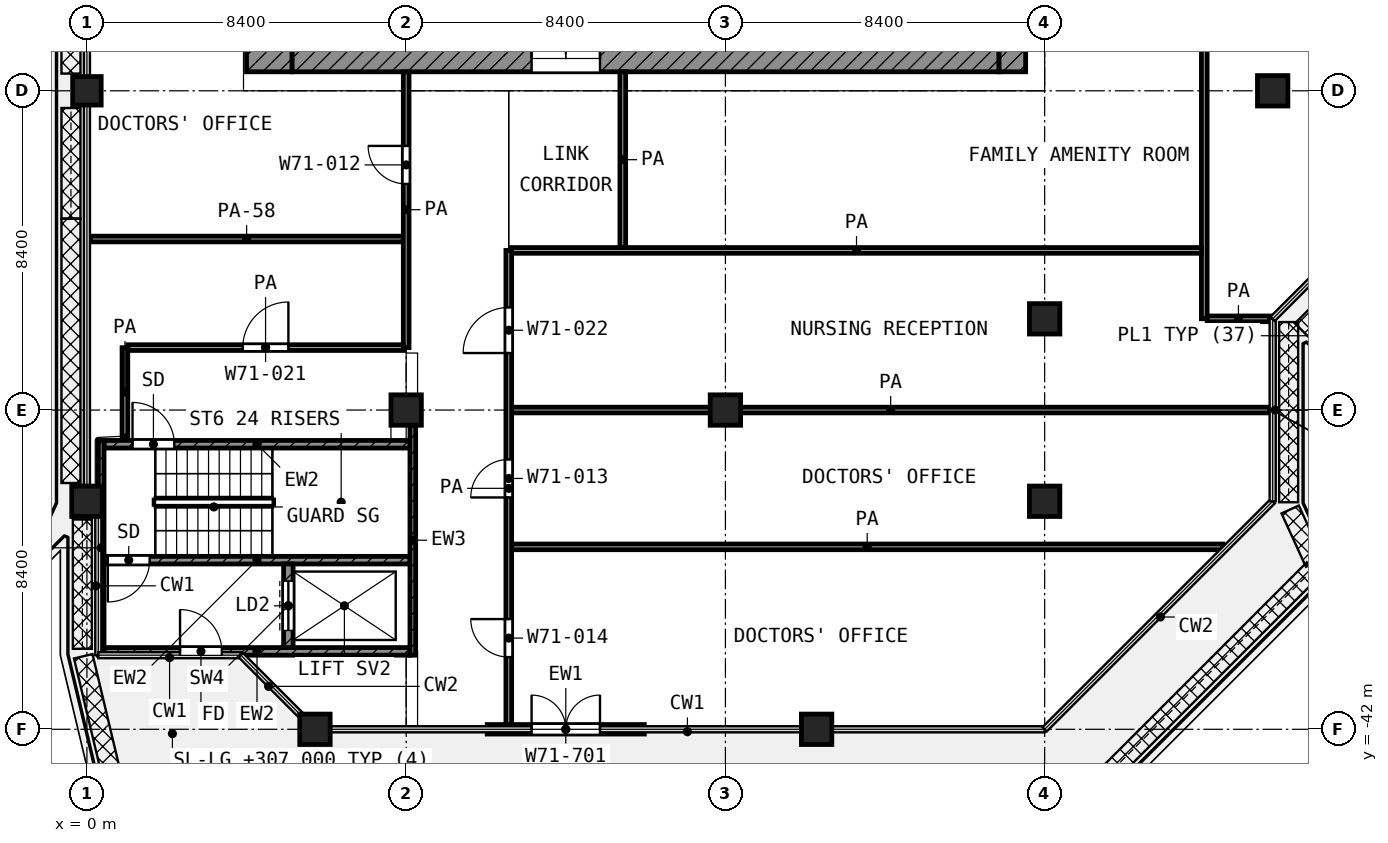
"""IFC4 building model, lengths in metres.
Left out: names, types, materials, properties, quantities, classifications, styles, units other than length and angle.
Written with IfcOpenShell. Run it as: python <this file> out.ifc"""

import sys

from ifc_helpers import new_model, si_unit, direction, frame, frame_2d, origin, origin_2d, place, context, subcontext, project, spatial, rectangle, extrude, element, fill, save


model = new_model("IFC4")
c1 = context("Model", 3, precision=1e-05, world=origin(), true_north=direction((0.0, 1.0)))
c2 = subcontext(c1, "Body", "Model", "MODEL_VIEW")
j1 = project(units=[si_unit("LENGTHUNIT", "METRE"), si_unit("PLANEANGLEUNIT", "RADIAN")], contexts=[c1])
p1 = place(None, origin())
s1 = spatial("IfcSite", under=j1, at=p1, CompositionType="ELEMENT")
p2 = place(p1, origin())
s2 = spatial("IfcBuilding", under=s1, at=p2, CompositionType="ELEMENT")
p3 = place(p2, frame((0.0, 0.0, 307.0)))
s3 = spatial("IfcBuildingStorey", under=s2, at=p3, CompositionType="ELEMENT", Elevation=307.0)
p4 = place(p3, frame((0.0, -25.2, 0.0), z_axis=(0.0, 0.0, 1.0), x_axis=(1.0, 0.0, 0.0)))
e1 = element("IfcColumn", 1, at=p4, inside=s3, PredefinedType="COLUMN", context=c2, shape_type="SweptSolid", body=[
    extrude(rectangle(XDim=0.75, YDim=0.75, at=origin_2d()), origin(), (0.0, 0.0, 1.0), 4.2),
])
for number, where, z_axis, x_axis in (
    (2, (31.2, -25.2, 0.0), (0.0, 0.0, 1.0), (1.0, 0.0, 0.0)),
    (3, (25.2, -31.2, 0.0), (0.0, 0.0, 1.0), (1.0, 0.0, 0.0)),
    (4, (8.4, -33.6, 0.0), (0.0, 0.0, 1.0), (1.0, 0.0, 0.0)),
    (5, (16.8, -33.6, 0.0), (0.0, 0.0, 1.0), (1.0, 0.0, 0.0)),
    (6, (0.0, -36.0, 0.0), (0.0, 0.0, 1.0), (1.0, 0.0, 0.0)),
    (7, (25.2, -36.0, 0.0), (0.0, 0.0, 1.0), (1.0, 0.0, 0.0)),
    (8, (6.0, -42.0, 0.0), (0.0, 0.0, 1.0), (1.0, 0.0, 0.0)),
    (9, (19.2, -42.0, 0.0), (0.0, 0.0, 1.0), (1.0, 0.0, 0.0)),
):
    element("IfcColumn", number, at=place(p3, frame(where, z_axis=z_axis, x_axis=x_axis)), inside=s3, PredefinedType="COLUMN", context=c2, shape_type="SweptSolid", body=[
        extrude(rectangle(XDim=0.8, YDim=0.8, at=origin_2d()), origin(), (0.0, 0.0, 1.0), 4.2),
    ])
p5 = place(p3, frame((10.533, -42.0, 0.0), z_axis=(0.0, 0.0, 1.0), x_axis=(1.0, 0.0, 0.0)))
e10 = element("IfcWall", 10, at=p5, inside=s3, PredefinedType="SOLIDWALL", context=c2, shape_type="SweptSolid", body=[
    extrude(rectangle(XDim=4.133, YDim=0.25, at=frame_2d((2.067, 0.0))), origin(), (0.0, 0.0, 1.0), 3.48),
])
p6 = place(p5, frame((1.167, 0.0, 0.0)))
e11 = element("IfcOpeningElement", 11, at=p6, cuts=e10, PredefinedType="OPENING", context=c2, shape_type="SweptSolid", body=[
    extrude(rectangle(XDim=1.8, YDim=2.1, at=frame_2d((0.9, 1.05))), frame((0.0, 0.135, 0.0), z_axis=(0.0, -1.0, 0.0), x_axis=(1.0, 0.0, 0.0)), (0.0, 0.0, 1.0), 0.27),
])
p7 = place(p3, frame((4.8, -24.7, 0.0), z_axis=(0.0, 0.0, 1.0), x_axis=(0.0, 1.0, 0.0)))
e12 = element("IfcWall", 12, at=p7, inside=s3, PredefinedType="SHEAR", context=c2, shape_type="SweptSolid", body=[
    extrude(rectangle(XDim=19.3, YDim=1.2, at=frame_2d((9.65, 0.0))), origin(), (0.0, 0.0, 1.0), 3.6),
])
p8 = place(p7, frame((11.15, 0.0, 0.0)))
e13 = element("IfcOpeningElement", 13, at=p8, cuts=e12, PredefinedType="OPENING", context=c2, shape_type="SweptSolid", body=[
    extrude(rectangle(XDim=1.1, YDim=2.1, at=frame_2d((0.55, 1.05))), frame((0.0, 0.61, 0.0), z_axis=(0.0, -1.0, 0.0), x_axis=(1.0, 0.0, 0.0)), (0.0, 0.0, 1.0), 1.22),
])
p9 = place(p7, frame((1.85, 0.0, 0.0)))
e14 = element("IfcOpeningElement", 14, at=p9, cuts=e12, PredefinedType="OPENING", context=c2, shape_type="SweptSolid", body=[
    extrude(rectangle(XDim=1.1, YDim=2.1, at=frame_2d((0.55, 1.05))), frame((0.0, 0.61, 0.0), z_axis=(0.0, -1.0, 0.0), x_axis=(1.0, 0.0, 0.0)), (0.0, 0.0, 1.0), 1.22),
])
p10 = place(p3, frame((5.4, -24.35, 0.0), z_axis=(0.0, 0.0, 1.0), x_axis=(1.0, 0.0, 0.0)))
e15 = element("IfcWall", 15, at=p10, inside=s3, PredefinedType="SHEAR", context=c2, shape_type="SweptSolid", body=[
    extrude(rectangle(XDim=18.6, YDim=0.7, at=frame_2d((9.3, 0.0))), origin(), (0.0, 0.0, 1.0), 3.6),
])
p11 = place(p10, frame((6.3, 0.0, 0.0)))
e16 = element("IfcOpeningElement", 16, at=p11, cuts=e15, PredefinedType="OPENING", context=c2, shape_type="SweptSolid", body=[
    extrude(rectangle(XDim=1.8, YDim=2.1, at=frame_2d((0.9, 1.05))), frame((0.0, 0.36, 0.0), z_axis=(0.0, -1.0, 0.0), x_axis=(1.0, 0.0, 0.0)), (0.0, 0.0, 1.0), 0.72),
])
p12 = place(p3, frame((24.35, -24.7, 0.0), z_axis=(0.0, 0.0, 1.0), x_axis=(0.0, 1.0, 0.0)))
e17 = element("IfcWall", 17, at=p12, inside=s3, PredefinedType="SHEAR", context=c2, shape_type="SweptSolid", body=[
    extrude(rectangle(XDim=0.7, YDim=0.7, at=frame_2d((0.35, 0.0))), origin(), (0.0, 0.0, 1.0), 3.6),
])
p13 = place(p3, frame((0.375, -40.05, 0.0), z_axis=(0.0, 0.0, 1.0), x_axis=(0.0, 1.0, 0.0)))
e18 = element("IfcWall", 18, at=p13, inside=s3, PredefinedType="SHEAR", context=c2, shape_type="SweptSolid", body=[
    extrude(rectangle(XDim=5.65, YDim=0.15, at=frame_2d((2.825, 0.0))), origin(), (0.0, 0.0, 1.0), 3.6),
])
p14 = place(p3, frame((8.575, -40.05, 0.0), z_axis=(0.0, 0.0, 1.0), x_axis=(0.0, 1.0, 0.0)))
e19 = element("IfcWall", 19, at=p14, inside=s3, PredefinedType="SHEAR", context=c2, shape_type="SweptSolid", body=[
    extrude(rectangle(XDim=6.05, YDim=0.15, at=frame_2d((3.025, 0.0))), origin(), (0.0, 0.0, 1.0), 3.6),
])
p15 = place(p3, frame((0.45, -34.5, 0.0), z_axis=(0.0, 0.0, 1.0), x_axis=(1.0, 0.0, 0.0)))
e20 = element("IfcWall", 20, at=p15, inside=s3, PredefinedType="SHEAR", context=c2, shape_type="SweptSolid", body=[
    extrude(rectangle(XDim=8.05, YDim=0.2, at=frame_2d((4.025, 0.0))), origin(), (0.0, 0.0, 1.0), 3.6),
])
p16 = place(p15, frame((0.75, 0.0, 0.0)))
e21 = element("IfcOpeningElement", 21, at=p16, cuts=e20, PredefinedType="OPENING", context=c2, shape_type="SweptSolid", body=[
    extrude(rectangle(XDim=1.1, YDim=2.1, at=frame_2d((0.55, 1.05))), frame((0.0, 0.11, 0.0), z_axis=(0.0, -1.0, 0.0), x_axis=(1.0, 0.0, 0.0)), (0.0, 0.0, 1.0), 0.22),
])
p17 = place(p3, frame((0.45, -37.55, 0.0), z_axis=(0.0, 0.0, 1.0), x_axis=(1.0, 0.0, 0.0)))
e22 = element("IfcWall", 22, at=p17, inside=s3, PredefinedType="SHEAR", context=c2, shape_type="SweptSolid", body=[
    extrude(rectangle(XDim=8.05, YDim=0.2, at=frame_2d((4.025, 0.0))), origin(), (0.0, 0.0, 1.0), 3.6),
])
p18 = place(p17, frame((0.1, 0.0, 0.0)))
e23 = element("IfcOpeningElement", 23, at=p18, cuts=e22, PredefinedType="OPENING", context=c2, shape_type="SweptSolid", body=[
    extrude(rectangle(XDim=1.1, YDim=2.1, at=frame_2d((0.55, 1.05))), frame((0.0, 0.11, 0.0), z_axis=(0.0, -1.0, 0.0), x_axis=(1.0, 0.0, 0.0)), (0.0, 0.0, 1.0), 0.22),
])
p19 = place(p3, frame((0.45, -39.95, 0.0), z_axis=(0.0, 0.0, 1.0), x_axis=(1.0, 0.0, 0.0)))
e24 = element("IfcWall", 24, at=p19, inside=s3, PredefinedType="SHEAR", context=c2, shape_type="SweptSolid", body=[
    extrude(rectangle(XDim=8.05, YDim=0.2, at=frame_2d((4.025, 0.0))), origin(), (0.0, 0.0, 1.0), 3.6),
])
p20 = place(p19, frame((2.0, 0.0, 0.0)))
e25 = element("IfcOpeningElement", 25, at=p20, cuts=e24, PredefinedType="OPENING", context=c2, shape_type="SweptSolid", body=[
    extrude(rectangle(XDim=1.1, YDim=2.1, at=frame_2d((0.55, 1.05))), frame((0.0, 0.11, 0.0), z_axis=(0.0, -1.0, 0.0), x_axis=(1.0, 0.0, 0.0)), (0.0, 0.0, 1.0), 0.22),
])
p21 = place(p3, frame((5.3, -39.85, 0.0), z_axis=(0.0, 0.0, 1.0), x_axis=(0.0, 1.0, 0.0)))
e26 = element("IfcWall", 26, at=p21, inside=s3, PredefinedType="SHEAR", context=c2, shape_type="SweptSolid", body=[
    extrude(rectangle(XDim=2.2, YDim=0.25, at=frame_2d((1.1, 0.0))), origin(), (0.0, 0.0, 1.0), 3.6),
])
p22 = place(p21, frame((0.45, 0.0, 0.0)))
e27 = element("IfcOpeningElement", 27, at=p22, cuts=e26, PredefinedType="OPENING", context=c2, shape_type="SweptSolid", body=[
    extrude(rectangle(XDim=1.3, YDim=2.1, at=frame_2d((0.65, 1.05))), frame((0.0, 0.135, 0.0), z_axis=(0.0, -1.0, 0.0), x_axis=(1.0, 0.0, 0.0)), (0.0, 0.0, 1.0), 0.27),
])
p23 = place(p3, frame((11.175, -37.2, 0.0), z_axis=(0.0, 0.0, 1.0), x_axis=(1.0, 0.0, 0.0)))
e28 = element("IfcWall", 28, at=p23, inside=s3, PredefinedType="PARTITIONING", context=c2, shape_type="SweptSolid", body=[
    extrude(rectangle(XDim=18.712, YDim=0.15, at=frame_2d((9.356, 0.0))), origin(), (0.0, 0.0, 1.0), 3.6),
])
p24 = place(p3, frame((11.175, -33.6, 0.0), z_axis=(0.0, 0.0, 1.0), x_axis=(1.0, 0.0, 0.0)))
e29 = element("IfcWall", 29, at=p24, inside=s3, PredefinedType="PARTITIONING", context=c2, shape_type="SweptSolid", body=[
    extrude(rectangle(XDim=19.945, YDim=0.15, at=frame_2d((9.973, 0.0))), origin(), (0.0, 0.0, 1.0), 3.6),
])
p25 = place(p3, frame((1.076, -31.957, 0.0), z_axis=(0.0, 0.0, 1.0), x_axis=(1.0, 0.0, 0.0)))
e30 = element("IfcWall", 30, at=p25, inside=s3, PredefinedType="PARTITIONING", context=c2, shape_type="SweptSolid", body=[
    extrude(rectangle(XDim=7.249, YDim=0.15, at=frame_2d((3.625, 0.0))), origin(), (0.0, 0.0, 1.0), 3.6),
])
p26 = place(p25, frame((3.025, 0.0, 0.0)))
e31 = element("IfcOpeningElement", 31, at=p26, cuts=e30, PredefinedType="OPENING", context=c2, shape_type="SweptSolid", body=[
    extrude(rectangle(XDim=1.2, YDim=2.1, at=frame_2d((0.6, 1.05))), frame((0.0, 0.085, 0.0), z_axis=(0.0, -1.0, 0.0), x_axis=(1.0, 0.0, 0.0)), (0.0, 0.0, 1.0), 0.17),
])
p27 = place(p3, frame((29.477, -31.2, 0.0), z_axis=(0.0, 0.0, 1.0), x_axis=(1.0, 0.0, 0.0)))
e32 = element("IfcWall", 32, at=p27, inside=s3, PredefinedType="PARTITIONING", context=c2, shape_type="SweptSolid", body=[
    extrude(rectangle(XDim=1.643, YDim=0.15, at=frame_2d((0.822, 0.0))), origin(), (0.0, 0.0, 1.0), 3.6),
])
p28 = place(p3, frame((11.175, -29.4, 0.0), z_axis=(0.0, 0.0, 1.0), x_axis=(1.0, 0.0, 0.0)))
e33 = element("IfcWall", 33, at=p28, inside=s3, PredefinedType="PARTITIONING", context=c2, shape_type="SweptSolid", body=[
    extrude(rectangle(XDim=18.15, YDim=0.15, at=frame_2d((9.075, 0.0))), origin(), (0.0, 0.0, 1.0), 3.6),
])
p29 = place(p3, frame((0.08, -29.1, 0.0), z_axis=(0.0, 0.0, 1.0), x_axis=(1.0, 0.0, 0.0)))
e34 = element("IfcWall", 34, at=p29, inside=s3, PredefinedType="PARTITIONING", context=c2, shape_type="SweptSolid", body=[
    extrude(rectangle(XDim=8.245, YDim=0.15, at=frame_2d((4.123, 0.0))), origin(), (0.0, 0.0, 1.0), 2.7),
])
p30 = place(p3, frame((1.0, -34.286, 0.0), z_axis=(0.0, 0.0, 1.0), x_axis=(0.0, 1.0, 0.0)))
e35 = element("IfcWall", 35, at=p30, inside=s3, PredefinedType="PARTITIONING", context=c2, shape_type="SweptSolid", body=[
    extrude(rectangle(XDim=2.327, YDim=0.15, at=frame_2d((1.164, 0.0))), origin(), (0.0, 0.0, 1.0), 3.6),
])
p31 = place(p3, frame((8.4, -31.957, 0.0), z_axis=(0.0, 0.0, 1.0), x_axis=(0.0, 1.0, 0.0)))
e36 = element("IfcWall", 36, at=p31, inside=s3, PredefinedType="PARTITIONING", context=c2, shape_type="SweptSolid", body=[
    extrude(rectangle(XDim=7.257, YDim=0.15, at=frame_2d((3.628, 0.0))), origin(), (0.0, 0.0, 1.0), 3.6),
])
p32 = place(p31, frame((4.307, 0.0, 0.0)))
e37 = element("IfcOpeningElement", 37, at=p32, cuts=e36, PredefinedType="OPENING", context=c2, shape_type="SweptSolid", body=[
    extrude(rectangle(XDim=1.0, YDim=2.1, at=frame_2d((0.5, 1.05))), frame((0.0, 0.085, 0.0), z_axis=(0.0, -1.0, 0.0), x_axis=(1.0, 0.0, 0.0)), (0.0, 0.0, 1.0), 0.17),
])
p33 = place(p3, frame((11.1, -41.92, 0.0), z_axis=(0.0, 0.0, 1.0), x_axis=(0.0, 1.0, 0.0)))
e38 = element("IfcWall", 38, at=p33, inside=s3, PredefinedType="PARTITIONING", context=c2, shape_type="SweptSolid", body=[
    extrude(rectangle(XDim=12.52, YDim=0.15, at=frame_2d((6.26, 0.0))), origin(), (0.0, 0.0, 1.0), 3.6),
])
p34 = place(p33, frame((9.82, 0.0, 0.0)))
e39 = element("IfcOpeningElement", 39, at=p34, cuts=e38, PredefinedType="OPENING", context=c2, shape_type="SweptSolid", body=[
    extrude(rectangle(XDim=1.2, YDim=2.1, at=frame_2d((0.6, 1.05))), frame((0.0, 0.085, 0.0), z_axis=(0.0, -1.0, 0.0), x_axis=(1.0, 0.0, 0.0)), (0.0, 0.0, 1.0), 0.17),
])
p35 = place(p33, frame((6.02, 0.0, 0.0)))
e40 = element("IfcOpeningElement", 40, at=p35, cuts=e38, PredefinedType="OPENING", context=c2, shape_type="SweptSolid", body=[
    extrude(rectangle(XDim=1.0, YDim=2.1, at=frame_2d((0.5, 1.05))), frame((0.0, 0.085, 0.0), z_axis=(0.0, -1.0, 0.0), x_axis=(1.0, 0.0, 0.0)), (0.0, 0.0, 1.0), 0.17),
])
p36 = place(p33, frame((1.82, 0.0, 0.0)))
e41 = element("IfcOpeningElement", 41, at=p36, cuts=e38, PredefinedType="OPENING", context=c2, shape_type="SweptSolid", body=[
    extrude(rectangle(XDim=1.0, YDim=2.1, at=frame_2d((0.5, 1.05))), frame((0.0, 0.085, 0.0), z_axis=(0.0, -1.0, 0.0), x_axis=(1.0, 0.0, 0.0)), (0.0, 0.0, 1.0), 0.17),
])
p37 = place(p3, frame((14.1, -29.325, 0.0), z_axis=(0.0, 0.0, 1.0), x_axis=(0.0, 1.0, 0.0)))
e42 = element("IfcWall", 42, at=p37, inside=s3, PredefinedType="PARTITIONING", context=c2, shape_type="SweptSolid", body=[
    extrude(rectangle(XDim=4.625, YDim=0.15, at=frame_2d((2.312, 0.0))), origin(), (0.0, 0.0, 1.0), 3.6),
])
p38 = place(p3, frame((29.4, -31.198, 0.0), z_axis=(0.0, 0.0, 1.0), x_axis=(0.0, 1.0, 0.0)))
e43 = element("IfcWall", 43, at=p38, inside=s3, PredefinedType="PARTITIONING", context=c2, shape_type="SweptSolid", body=[
    extrude(rectangle(XDim=20.098, YDim=0.15, at=frame_2d((10.049, 0.0))), origin(), (0.0, 0.0, 1.0), 3.6),
])
p39 = place(p6, origin())
e44 = element("IfcDoor", 44, at=p39, inside=s3, OperationType="DOUBLE_DOOR_SINGLE_SWING", PredefinedType="DOOR", context=c2, shape_type="SweptSolid", body=[
    extrude(rectangle(XDim=1.8, YDim=2.1, at=frame_2d((0.9, 1.05))), frame((0.0, 0.025, 0.0), z_axis=(0.0, -1.0, 0.0), x_axis=(1.0, 0.0, 0.0)), (0.0, 0.0, 1.0), 0.05),
])
fill(e11, e44)
p40 = place(p11, origin())
e45 = element("IfcDoor", 45, at=p40, inside=s3, OperationType="DOUBLE_DOOR_SINGLE_SWING", PredefinedType="DOOR", context=c2, shape_type="SweptSolid", body=[
    extrude(rectangle(XDim=1.8, YDim=2.1, at=frame_2d((0.9, 1.05))), frame((0.0, 0.025, 0.0), z_axis=(0.0, -1.0, 0.0), x_axis=(1.0, 0.0, 0.0)), (0.0, 0.0, 1.0), 0.05),
])
fill(e16, e45)
p41 = place(p16, origin())
e46 = element("IfcDoor", 46, at=p41, inside=s3, OperationType="SINGLE_SWING_LEFT", PredefinedType="DOOR", context=c2, shape_type="SweptSolid", body=[
    extrude(rectangle(XDim=1.1, YDim=2.1, at=frame_2d((0.55, 1.05))), frame((0.0, 0.025, 0.0), z_axis=(0.0, -1.0, 0.0), x_axis=(1.0, 0.0, 0.0)), (0.0, 0.0, 1.0), 0.05),
])
fill(e21, e46)
p42 = place(p18, frame((1.1, 0.0, 0.0), z_axis=(0.0, 0.0, 1.0), x_axis=(-1.0, 0.0, 0.0)))
e47 = element("IfcDoor", 47, at=p42, inside=s3, OperationType="SINGLE_SWING_LEFT", PredefinedType="DOOR", context=c2, shape_type="SweptSolid", body=[
    extrude(rectangle(XDim=1.1, YDim=2.1, at=frame_2d((0.55, 1.05))), frame((0.0, 0.025, 0.0), z_axis=(0.0, -1.0, 0.0), x_axis=(1.0, 0.0, 0.0)), (0.0, 0.0, 1.0), 0.05),
])
fill(e23, e47)
p43 = place(p22, origin())
e48 = element("IfcDoor", 48, at=p43, inside=s3, OperationType="DOUBLE_DOOR_SLIDING", PredefinedType="DOOR", context=c2, shape_type="SweptSolid", body=[
    extrude(rectangle(XDim=1.3, YDim=2.1, at=frame_2d((0.65, 1.05))), frame((0.0, 0.025, 0.0), z_axis=(0.0, -1.0, 0.0), x_axis=(1.0, 0.0, 0.0)), (0.0, 0.0, 1.0), 0.05),
])
fill(e27, e48)
p44 = place(p20, origin())
e49 = element("IfcDoor", 49, at=p44, inside=s3, OperationType="SINGLE_SWING_LEFT", PredefinedType="DOOR", context=c2, shape_type="SweptSolid", body=[
    extrude(rectangle(XDim=1.1, YDim=2.1, at=frame_2d((0.55, 1.05))), frame((0.0, 0.025, 0.0), z_axis=(0.0, -1.0, 0.0), x_axis=(1.0, 0.0, 0.0)), (0.0, 0.0, 1.0), 0.05),
])
fill(e25, e49)
p45 = place(p32, origin())
e50 = element("IfcDoor", 50, at=p45, inside=s3, OperationType="SINGLE_SWING_RIGHT", PredefinedType="DOOR", context=c2, shape_type="SweptSolid", body=[
    extrude(rectangle(XDim=1.0, YDim=2.1, at=frame_2d((0.5, 1.05))), frame((0.0, 0.025, 0.0), z_axis=(0.0, -1.0, 0.0), x_axis=(1.0, 0.0, 0.0)), (0.0, 0.0, 1.0), 0.05),
])
fill(e37, e50)
p46 = place(p26, origin())
e51 = element("IfcDoor", 51, at=p46, inside=s3, OperationType="SINGLE_SWING_RIGHT", PredefinedType="DOOR", context=c2, shape_type="SweptSolid", body=[
    extrude(rectangle(XDim=1.2, YDim=2.1, at=frame_2d((0.6, 1.05))), frame((0.0, 0.025, 0.0), z_axis=(0.0, -1.0, 0.0), x_axis=(1.0, 0.0, 0.0)), (0.0, 0.0, 1.0), 0.05),
])
fill(e31, e51)
p47 = place(p34, origin())
e52 = element("IfcDoor", 52, at=p47, inside=s3, OperationType="SINGLE_SWING_LEFT", PredefinedType="DOOR", context=c2, shape_type="SweptSolid", body=[
    extrude(rectangle(XDim=1.2, YDim=2.1, at=frame_2d((0.6, 1.05))), frame((0.0, 0.025, 0.0), z_axis=(0.0, -1.0, 0.0), x_axis=(1.0, 0.0, 0.0)), (0.0, 0.0, 1.0), 0.05),
])
fill(e39, e52)
p48 = place(p35, origin())
e53 = element("IfcDoor", 53, at=p48, inside=s3, OperationType="SINGLE_SWING_LEFT", PredefinedType="DOOR", context=c2, shape_type="SweptSolid", body=[
    extrude(rectangle(XDim=1.0, YDim=2.1, at=frame_2d((0.5, 1.05))), frame((0.0, 0.025, 0.0), z_axis=(0.0, -1.0, 0.0), x_axis=(1.0, 0.0, 0.0)), (0.0, 0.0, 1.0), 0.05),
])
fill(e40, e53)
p49 = place(p36, origin())
e54 = element("IfcDoor", 54, at=p49, inside=s3, OperationType="SINGLE_SWING_RIGHT", PredefinedType="DOOR", context=c2, shape_type="SweptSolid", body=[
    extrude(rectangle(XDim=1.0, YDim=2.1, at=frame_2d((0.5, 1.05))), frame((0.0, 0.025, 0.0), z_axis=(0.0, -1.0, 0.0), x_axis=(1.0, 0.0, 0.0)), (0.0, 0.0, 1.0), 0.05),
])
fill(e41, e54)
save(model, sys.argv[1])
